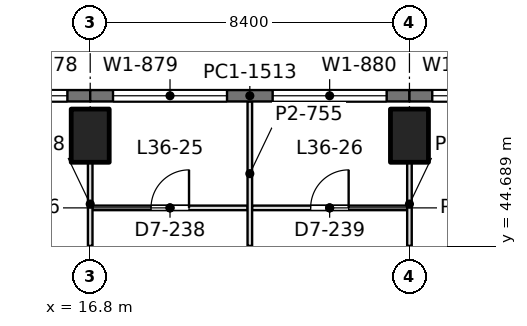
"""IFC4 building model, lengths in metres.
Left out: names, types, materials, properties, quantities, classifications, styles, units other than length and angle.
Written with IfcOpenShell. Run it as: python <this file> out.ifc"""

import sys

from ifc_helpers import new_model, si_unit, direction, frame, frame_2d, origin, origin_2d, place, context, subcontext, project, spatial, rectangle, extrude, element, fill, save


model = new_model("IFC4")
c1 = context("Model", 3, precision=1e-05, world=origin(), true_north=direction((0.0, 1.0)))
c2 = subcontext(c1, "Body", "Model", "MODEL_VIEW")
j1 = project(units=[si_unit("LENGTHUNIT", "METRE"), si_unit("PLANEANGLEUNIT", "RADIAN")], contexts=[c1])
p1 = place(None, origin())
s1 = spatial("IfcSite", under=j1, at=p1, CompositionType="ELEMENT")
p2 = place(p1, origin())
s2 = spatial("IfcBuilding", under=s1, at=p2, CompositionType="ELEMENT")
p3 = place(p2, frame((0.0, 0.0, 159.6)))
s3 = spatial("IfcBuildingStorey", under=s2, at=p3, CompositionType="ELEMENT", Elevation=159.6)
for number, where, z_axis, x_axis in (
    (1, (16.8, 47.6, 0.0), (0.0, 0.0, 1.0), (1.0, 0.0, 0.0)),
    (2, (25.2, 47.6, 0.0), (0.0, 0.0, 1.0), (1.0, 0.0, 0.0)),
):
    element("IfcColumn", number, at=place(p3, frame(where, z_axis=z_axis, x_axis=x_axis)), inside=s3, PredefinedType="COLUMN", context=c2, shape_type="SweptSolid", body=[
        extrude(rectangle(XDim=1.0, YDim=1.4, at=origin_2d()), origin(), (0.0, 0.0, 1.0), 4.2),
    ])
p4 = place(p3, frame((8.4, 48.65, 0.0), z_axis=(0.0, 0.0, 1.0), x_axis=(1.0, 0.0, 0.0)))
e3 = element("IfcWall", 3, at=p4, inside=s3, PredefinedType="SOLIDWALL", context=c2, shape_type="SweptSolid", body=[
    extrude(rectangle(XDim=8.4, YDim=0.3, at=frame_2d((4.2, 0.0))), origin(), (0.0, 0.0, 1.0), 4.05),
])
p5 = place(p4, frame((0.6, 0.0, 0.9)))
e4 = element("IfcOpeningElement", 4, at=p5, cuts=e3, PredefinedType="OPENING", context=c2, shape_type="SweptSolid", body=[
    extrude(rectangle(XDim=3.0, YDim=1.9, at=frame_2d((1.5, 0.95))), frame((0.0, 0.16, 0.0), z_axis=(0.0, -1.0, 0.0), x_axis=(1.0, 0.0, 0.0)), (0.0, 0.0, 1.0), 0.32),
])
p6 = place(p4, frame((4.8, 0.0, 0.9)))
e5 = element("IfcOpeningElement", 5, at=p6, cuts=e3, PredefinedType="OPENING", context=c2, shape_type="SweptSolid", body=[
    extrude(rectangle(XDim=3.0, YDim=1.9, at=frame_2d((1.5, 0.95))), frame((0.0, 0.16, 0.0), z_axis=(0.0, -1.0, 0.0), x_axis=(1.0, 0.0, 0.0)), (0.0, 0.0, 1.0), 0.32),
])
p7 = place(p3, frame((16.8, 48.65, 0.0), z_axis=(0.0, 0.0, 1.0), x_axis=(1.0, 0.0, 0.0)))
e6 = element("IfcWall", 6, at=p7, inside=s3, PredefinedType="SOLIDWALL", context=c2, shape_type="SweptSolid", body=[
    extrude(rectangle(XDim=8.4, YDim=0.3, at=frame_2d((4.2, 0.0))), origin(), (0.0, 0.0, 1.0), 4.05),
])
p8 = place(p7, frame((0.6, 0.0, 0.9)))
e7 = element("IfcOpeningElement", 7, at=p8, cuts=e6, PredefinedType="OPENING", context=c2, shape_type="SweptSolid", body=[
    extrude(rectangle(XDim=3.0, YDim=1.9, at=frame_2d((1.5, 0.95))), frame((0.0, 0.16, 0.0), z_axis=(0.0, -1.0, 0.0), x_axis=(1.0, 0.0, 0.0)), (0.0, 0.0, 1.0), 0.32),
])
p9 = place(p7, frame((4.8, 0.0, 0.9)))
e8 = element("IfcOpeningElement", 8, at=p9, cuts=e6, PredefinedType="OPENING", context=c2, shape_type="SweptSolid", body=[
    extrude(rectangle(XDim=3.0, YDim=1.9, at=frame_2d((1.5, 0.95))), frame((0.0, 0.16, 0.0), z_axis=(0.0, -1.0, 0.0), x_axis=(1.0, 0.0, 0.0)), (0.0, 0.0, 1.0), 0.32),
])
p10 = place(p3, frame((25.2, 48.65, 0.0), z_axis=(0.0, 0.0, 1.0), x_axis=(1.0, 0.0, 0.0)))
e9 = element("IfcWall", 9, at=p10, inside=s3, PredefinedType="SOLIDWALL", context=c2, shape_type="SweptSolid", body=[
    extrude(rectangle(XDim=8.4, YDim=0.3, at=frame_2d((4.2, 0.0))), origin(), (0.0, 0.0, 1.0), 4.05),
])
p11 = place(p10, frame((0.6, 0.0, 0.9)))
e10 = element("IfcOpeningElement", 10, at=p11, cuts=e9, PredefinedType="OPENING", context=c2, shape_type="SweptSolid", body=[
    extrude(rectangle(XDim=3.0, YDim=1.9, at=frame_2d((1.5, 0.95))), frame((0.0, 0.16, 0.0), z_axis=(0.0, -1.0, 0.0), x_axis=(1.0, 0.0, 0.0)), (0.0, 0.0, 1.0), 0.32),
])
p12 = place(p10, frame((4.8, 0.0, 0.9)))
e11 = element("IfcOpeningElement", 11, at=p12, cuts=e9, PredefinedType="OPENING", context=c2, shape_type="SweptSolid", body=[
    extrude(rectangle(XDim=3.0, YDim=1.9, at=frame_2d((1.5, 0.95))), frame((0.0, 0.16, 0.0), z_axis=(0.0, -1.0, 0.0), x_axis=(1.0, 0.0, 0.0)), (0.0, 0.0, 1.0), 0.32),
])
p13 = place(p3, frame((16.858, 45.7, 0.0), z_axis=(0.0, 0.0, 1.0), x_axis=(1.0, 0.0, 0.0)))
e12 = element("IfcWall", 12, at=p13, inside=s3, PredefinedType="PARTITIONING", context=c2, shape_type="SweptSolid", body=[
    extrude(rectangle(XDim=4.084, YDim=0.12, at=frame_2d((2.042, 0.0))), origin(), (0.0, 0.0, 1.0), 3.55),
])
p14 = place(p13, frame((1.542, 0.0, 0.0)))
e13 = element("IfcOpeningElement", 13, at=p14, cuts=e12, PredefinedType="OPENING", context=c2, shape_type="SweptSolid", body=[
    extrude(rectangle(XDim=1.0, YDim=2.4, at=frame_2d((0.5, 1.2))), frame((0.0, 0.07, 0.0), z_axis=(0.0, -1.0, 0.0), x_axis=(1.0, 0.0, 0.0)), (0.0, 0.0, 1.0), 0.14),
])
p15 = place(p3, frame((21.058, 45.7, 0.0), z_axis=(0.0, 0.0, 1.0), x_axis=(1.0, 0.0, 0.0)))
e14 = element("IfcWall", 14, at=p15, inside=s3, PredefinedType="PARTITIONING", context=c2, shape_type="SweptSolid", body=[
    extrude(rectangle(XDim=4.084, YDim=0.12, at=frame_2d((2.042, 0.0))), origin(), (0.0, 0.0, 1.0), 3.55),
])
p16 = place(p15, frame((1.542, 0.0, 0.0)))
e15 = element("IfcOpeningElement", 15, at=p16, cuts=e14, PredefinedType="OPENING", context=c2, shape_type="SweptSolid", body=[
    extrude(rectangle(XDim=1.0, YDim=2.4, at=frame_2d((0.5, 1.2))), frame((0.0, 0.07, 0.0), z_axis=(0.0, -1.0, 0.0), x_axis=(1.0, 0.0, 0.0)), (0.0, 0.0, 1.0), 0.14),
])
p17 = place(p3, frame((16.8, 44.7, 0.0), z_axis=(0.0, 0.0, 1.0), x_axis=(0.0, 1.0, 0.0)))
e16 = element("IfcWall", 16, at=p17, inside=s3, PredefinedType="PARTITIONING", context=c2, shape_type="SweptSolid", body=[
    extrude(rectangle(XDim=2.201, YDim=0.12, at=frame_2d((1.101, 0.0))), origin(), (0.0, 0.0, 1.0), 3.55),
])
p18 = place(p3, frame((21.0, 44.7, 0.0), z_axis=(0.0, 0.0, 1.0), x_axis=(0.0, 1.0, 0.0)))
e17 = element("IfcWall", 17, at=p18, inside=s3, PredefinedType="PARTITIONING", context=c2, shape_type="SweptSolid", body=[
    extrude(rectangle(XDim=3.802, YDim=0.12, at=frame_2d((1.901, 0.0))), origin(), (0.0, 0.0, 1.0), 3.56),
])
p19 = place(p3, frame((25.2, 44.7, 0.0), z_axis=(0.0, 0.0, 1.0), x_axis=(0.0, 1.0, 0.0)))
e18 = element("IfcWall", 18, at=p19, inside=s3, PredefinedType="PARTITIONING", context=c2, shape_type="SweptSolid", body=[
    extrude(rectangle(XDim=2.201, YDim=0.12, at=frame_2d((1.101, 0.0))), origin(), (0.0, 0.0, 1.0), 3.55),
])
p20 = place(p6, origin())
e19 = element("IfcWindow", 19, at=p20, inside=s3, PartitioningType="SINGLE_PANEL", PredefinedType="WINDOW", context=c2, shape_type="SweptSolid", body=[
    extrude(rectangle(XDim=3.0, YDim=1.9, at=frame_2d((1.5, 0.95))), frame((0.0, 0.03, 0.0), z_axis=(0.0, -1.0, 0.0), x_axis=(1.0, 0.0, 0.0)), (0.0, 0.0, 1.0), 0.06),
])
fill(e5, e19)
p21 = place(p8, origin())
e20 = element("IfcWindow", 20, at=p21, inside=s3, PartitioningType="SINGLE_PANEL", PredefinedType="WINDOW", context=c2, shape_type="SweptSolid", body=[
    extrude(rectangle(XDim=3.0, YDim=1.9, at=frame_2d((1.5, 0.95))), frame((0.0, 0.03, 0.0), z_axis=(0.0, -1.0, 0.0), x_axis=(1.0, 0.0, 0.0)), (0.0, 0.0, 1.0), 0.06),
])
fill(e7, e20)
p22 = place(p9, origin())
e21 = element("IfcWindow", 21, at=p22, inside=s3, PartitioningType="SINGLE_PANEL", PredefinedType="WINDOW", context=c2, shape_type="SweptSolid", body=[
    extrude(rectangle(XDim=3.0, YDim=1.9, at=frame_2d((1.5, 0.95))), frame((0.0, 0.03, 0.0), z_axis=(0.0, -1.0, 0.0), x_axis=(1.0, 0.0, 0.0)), (0.0, 0.0, 1.0), 0.06),
])
fill(e8, e21)
p23 = place(p11, origin())
e22 = element("IfcWindow", 22, at=p23, inside=s3, PartitioningType="SINGLE_PANEL", PredefinedType="WINDOW", context=c2, shape_type="SweptSolid", body=[
    extrude(rectangle(XDim=3.0, YDim=1.9, at=frame_2d((1.5, 0.95))), frame((0.0, 0.03, 0.0), z_axis=(0.0, -1.0, 0.0), x_axis=(1.0, 0.0, 0.0)), (0.0, 0.0, 1.0), 0.06),
])
fill(e10, e22)
p24 = place(p14, origin())
e23 = element("IfcDoor", 23, at=p24, inside=s3, OperationType="SINGLE_SWING_RIGHT", PredefinedType="DOOR", context=c2, shape_type="SweptSolid", body=[
    extrude(rectangle(XDim=1.0, YDim=2.4, at=frame_2d((0.5, 1.2))), frame((0.0, 0.025, 0.0), z_axis=(0.0, -1.0, 0.0), x_axis=(1.0, 0.0, 0.0)), (0.0, 0.0, 1.0), 0.05),
])
fill(e13, e23)
p25 = place(p16, origin())
e24 = element("IfcDoor", 24, at=p25, inside=s3, OperationType="SINGLE_SWING_RIGHT", PredefinedType="DOOR", context=c2, shape_type="SweptSolid", body=[
    extrude(rectangle(XDim=1.0, YDim=2.4, at=frame_2d((0.5, 1.2))), frame((0.0, 0.025, 0.0), z_axis=(0.0, -1.0, 0.0), x_axis=(1.0, 0.0, 0.0)), (0.0, 0.0, 1.0), 0.05),
])
fill(e15, e24)
save(model, sys.argv[1])
